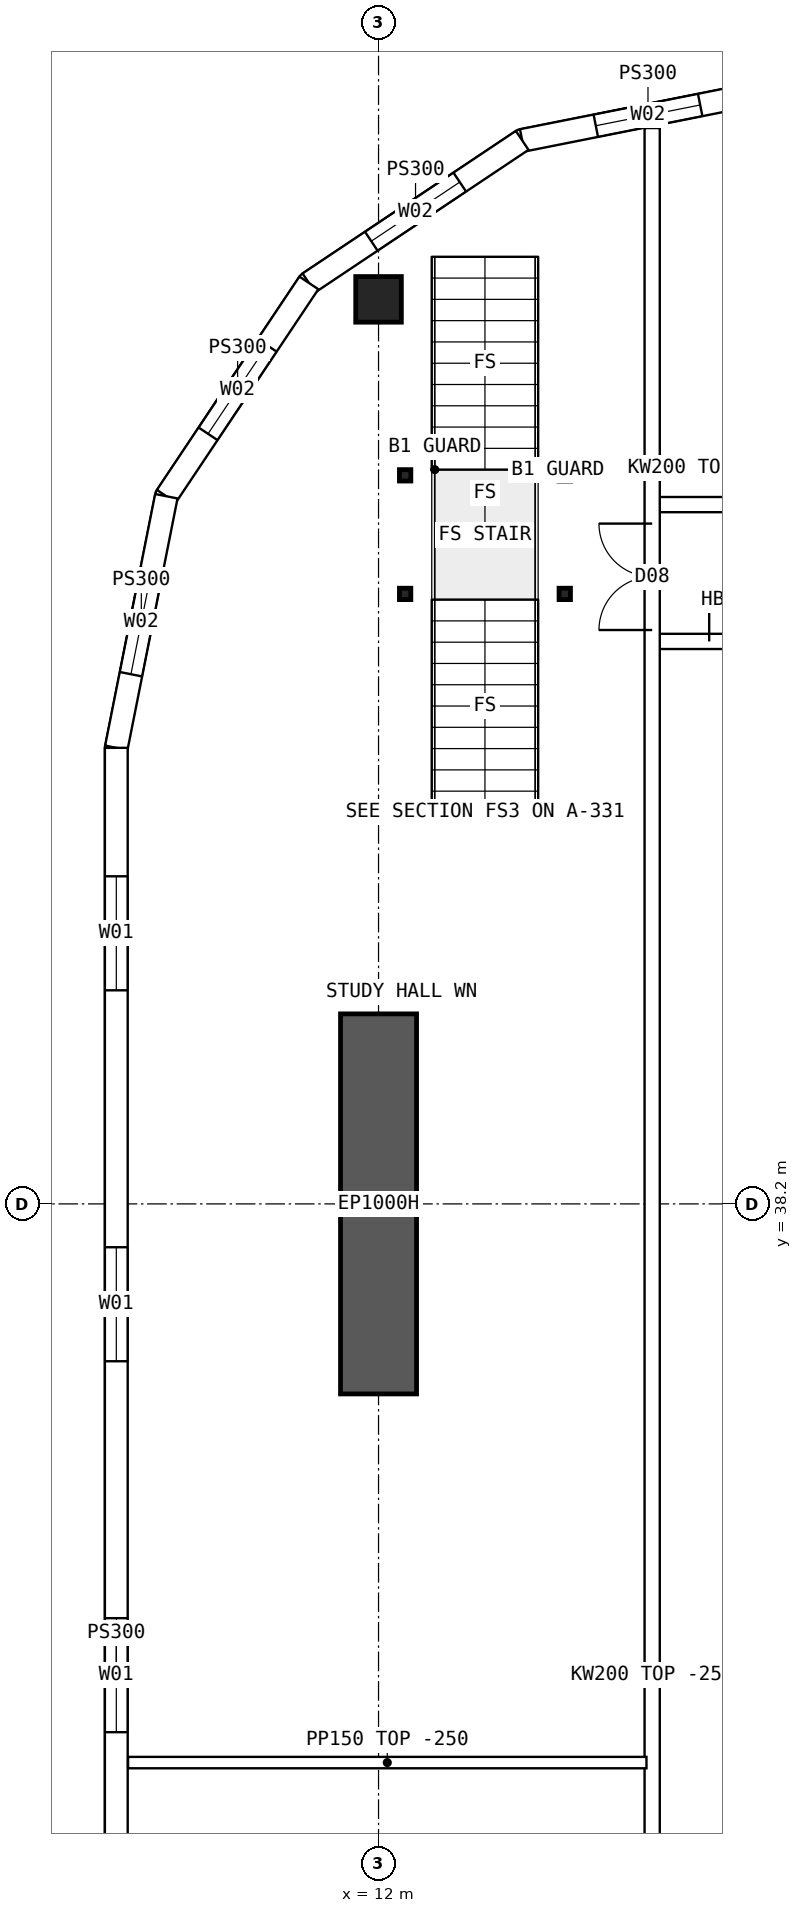
"""IFC4 building model, lengths in metres.
Left out: names, types, materials, properties, quantities, classifications, styles, units other than length and angle.
Written with IfcOpenShell. Run it as: python <this file> out.ifc"""

import sys

from ifc_helpers import new_model, si_unit, direction, frame, frame_2d, origin, origin_2d, place, context, subcontext, project, spatial, polyline, rectangle, hollow_rectangle, outline, extrude, element, fill, save


model = new_model("IFC4")
c1 = context("Model", 3, precision=1e-05, world=origin(), true_north=direction((0.0, 1.0)))
c2 = subcontext(c1, "Body", "Model", "MODEL_VIEW")
j1 = project(units=[si_unit("LENGTHUNIT", "METRE"), si_unit("PLANEANGLEUNIT", "RADIAN")], contexts=[c1])
p1 = place(None, origin())
s1 = spatial("IfcSite", under=j1, at=p1, CompositionType="ELEMENT")
p2 = place(p1, origin())
s2 = spatial("IfcBuilding", under=s1, at=p2, CompositionType="ELEMENT")
p3 = place(p2, frame((0.0, 0.0, 231.55)))
s3 = spatial("IfcBuildingStorey", under=s2, at=p3, CompositionType="ELEMENT", Elevation=231.55)
p4 = place(p3, frame((12.0, 50.1, 0.0), z_axis=(0.0, 0.0, 1.0), x_axis=(1.0, 0.0, 0.0)))
e1 = element("IfcColumn", 1, at=p4, inside=s3, PredefinedType="COLUMN", context=c2, shape_type="SweptSolid", body=[
    extrude(hollow_rectangle(XDim=0.6, YDim=0.6, WallThickness=0.06, at=origin_2d()), origin(), (0.0, 0.0, 1.0), 3.75),
])
p5 = place(p3, frame((12.0, 35.7, 0.0), z_axis=(0.0, 0.0, 1.0), x_axis=(0.0, 1.0, 0.0)))
e2 = element("IfcWall", 2, at=p5, inside=s3, PredefinedType="SHEAR", context=c2, shape_type="SweptSolid", body=[
    extrude(rectangle(XDim=5.0, YDim=1.0, at=frame_2d((2.5, 0.0))), origin(), (0.0, 0.0, 1.0), 3.75),
])
p6 = place(p3, frame((8.55, 44.2, 0.0), z_axis=(0.0, 0.0, 1.0), x_axis=(0.0, -1.0, 0.0)))
e3 = element("IfcWall", 3, at=p6, inside=s3, PredefinedType="SOLIDWALL", context=c2, shape_type="SweptSolid", body=[
    extrude(outline(polyline([(-0.015, -0.15), (24.415, -0.15), (24.385, 0.15), (0.015, 0.15), (-0.015, -0.15)])), origin(), (0.0, 0.0, 1.0), 3.5),
])
p7 = place(p6, frame((1.69, 0.0, 0.9)))
e4 = element("IfcOpeningElement", 4, at=p7, cuts=e3, PredefinedType="OPENING", context=c2, shape_type="SweptSolid", body=[
    extrude(rectangle(XDim=1.5, YDim=2.0, at=frame_2d((0.75, 1.0))), frame((0.0, 0.16, 0.0), z_axis=(0.0, -1.0, 0.0), x_axis=(1.0, 0.0, 0.0)), (0.0, 0.0, 1.0), 0.32),
])
p8 = place(p6, frame((6.57, 0.0, 0.9)))
e5 = element("IfcOpeningElement", 5, at=p8, cuts=e3, PredefinedType="OPENING", context=c2, shape_type="SweptSolid", body=[
    extrude(rectangle(XDim=1.5, YDim=2.0, at=frame_2d((0.75, 1.0))), frame((0.0, 0.16, 0.0), z_axis=(0.0, -1.0, 0.0), x_axis=(1.0, 0.0, 0.0)), (0.0, 0.0, 1.0), 0.32),
])
p9 = place(p6, frame((11.45, 0.0, 0.9)))
e6 = element("IfcOpeningElement", 6, at=p9, cuts=e3, PredefinedType="OPENING", context=c2, shape_type="SweptSolid", body=[
    extrude(rectangle(XDim=1.5, YDim=2.0, at=frame_2d((0.75, 1.0))), frame((0.0, 0.16, 0.0), z_axis=(0.0, -1.0, 0.0), x_axis=(1.0, 0.0, 0.0)), (0.0, 0.0, 1.0), 0.32),
])
p10 = place(p6, frame((16.33, 0.0, 0.9)))
e7 = element("IfcOpeningElement", 7, at=p10, cuts=e3, PredefinedType="OPENING", context=c2, shape_type="SweptSolid", body=[
    extrude(rectangle(XDim=1.5, YDim=2.0, at=frame_2d((0.75, 1.0))), frame((0.0, 0.16, 0.0), z_axis=(0.0, -1.0, 0.0), x_axis=(1.0, 0.0, 0.0)), (0.0, 0.0, 1.0), 0.32),
])
p11 = place(p6, frame((21.21, 0.0, 0.9)))
e8 = element("IfcOpeningElement", 8, at=p11, cuts=e3, PredefinedType="OPENING", context=c2, shape_type="SweptSolid", body=[
    extrude(rectangle(XDim=1.5, YDim=2.0, at=frame_2d((0.75, 1.0))), frame((0.0, 0.16, 0.0), z_axis=(0.0, -1.0, 0.0), x_axis=(1.0, 0.0, 0.0)), (0.0, 0.0, 1.0), 0.32),
])
p12 = place(p3, frame((17.2, 52.85, 0.0), z_axis=(0.0, 0.0, 1.0), x_axis=(-0.98078325777, -0.195100490205, 0.0)))
e9 = element("IfcWall", 9, at=p12, inside=s3, PredefinedType="SOLIDWALL", context=c2, shape_type="SweptSolid", body=[
    extrude(outline(polyline([(-0.03, -0.15), (3.405, -0.15), (3.345, 0.15), (0.03, 0.15), (-0.03, -0.15)])), origin(), (0.0, 0.0, 1.0), 3.5),
])
p13 = place(p12, frame((0.988, 0.0, 0.9)))
e10 = element("IfcOpeningElement", 10, at=p13, cuts=e9, PredefinedType="OPENING", context=c2, shape_type="SweptSolid", body=[
    extrude(rectangle(XDim=1.4, YDim=1.8, at=frame_2d((0.7, 0.9))), frame((0.0, 0.16, 0.0), z_axis=(0.0, -1.0, 0.0), x_axis=(1.0, 0.0, 0.0)), (0.0, 0.0, 1.0), 0.32),
])
p14 = place(p3, frame((13.89, 52.192, 0.0), z_axis=(0.0, 0.0, 1.0), x_axis=(-0.831460037396, -0.555584562613, 0.0)))
e11 = element("IfcWall", 11, at=p14, inside=s3, PredefinedType="SOLIDWALL", context=c2, shape_type="SweptSolid", body=[
    extrude(outline(polyline([(-0.03, -0.15), (3.405, -0.15), (3.345, 0.15), (0.03, 0.15), (-0.03, -0.15)])), origin(), (0.0, 0.0, 1.0), 3.5),
])
p15 = place(p14, frame((0.988, 0.0, 0.9)))
e12 = element("IfcOpeningElement", 12, at=p15, cuts=e11, PredefinedType="OPENING", context=c2, shape_type="SweptSolid", body=[
    extrude(rectangle(XDim=1.4, YDim=1.8, at=frame_2d((0.7, 0.9))), frame((0.0, 0.16, 0.0), z_axis=(0.0, -1.0, 0.0), x_axis=(1.0, 0.0, 0.0)), (0.0, 0.0, 1.0), 0.32),
])
p16 = place(p3, frame((11.083, 50.316, 0.0), z_axis=(0.0, 0.0, 1.0), x_axis=(-0.555567969291, -0.831471124873, 0.0)))
e13 = element("IfcWall", 13, at=p16, inside=s3, PredefinedType="SOLIDWALL", context=c2, shape_type="SweptSolid", body=[
    extrude(outline(polyline([(-0.03, -0.15), (3.405, -0.15), (3.345, 0.15), (0.03, 0.15), (-0.03, -0.15)])), origin(), (0.0, 0.0, 1.0), 3.5),
])
p17 = place(p16, frame((0.988, 0.0, 0.9)))
e14 = element("IfcOpeningElement", 14, at=p17, cuts=e13, PredefinedType="OPENING", context=c2, shape_type="SweptSolid", body=[
    extrude(rectangle(XDim=1.4, YDim=1.8, at=frame_2d((0.7, 0.9))), frame((0.0, 0.16, 0.0), z_axis=(0.0, -1.0, 0.0), x_axis=(1.0, 0.0, 0.0)), (0.0, 0.0, 1.0), 0.32),
])
p18 = place(p3, frame((9.208, 47.51, 0.0), z_axis=(0.0, 0.0, 1.0), x_axis=(-0.19508664885, -0.980786011034, 0.0)))
e15 = element("IfcWall", 15, at=p18, inside=s3, PredefinedType="SOLIDWALL", context=c2, shape_type="SweptSolid", body=[
    extrude(outline(polyline([(-0.03, -0.15), (3.39, -0.15), (3.36, 0.15), (0.03, 0.15), (-0.03, -0.15)])), origin(), (0.0, 0.0, 1.0), 3.5),
])
p19 = place(p18, frame((0.988, 0.0, 0.9)))
e16 = element("IfcOpeningElement", 16, at=p19, cuts=e15, PredefinedType="OPENING", context=c2, shape_type="SweptSolid", body=[
    extrude(rectangle(XDim=1.4, YDim=1.8, at=frame_2d((0.7, 0.9))), frame((0.0, 0.16, 0.0), z_axis=(0.0, -1.0, 0.0), x_axis=(1.0, 0.0, 0.0)), (0.0, 0.0, 1.0), 0.32),
])
p20 = place(p3, frame((15.6, 47.4, 0.0), z_axis=(0.0, 0.0, 1.0), x_axis=(1.0, 0.0, 0.0)))
e17 = element("IfcWall", 17, at=p20, inside=s3, PredefinedType="SOLIDWALL", context=c2, shape_type="SweptSolid", body=[
    extrude(rectangle(XDim=2.05, YDim=0.2, at=frame_2d((1.025, 0.0))), origin(), (0.0, 0.0, 1.0), 3.5),
])
p21 = place(p20, frame((0.95, 0.0, 0.0)))
e18 = element("IfcOpeningElement", 18, at=p21, cuts=e17, PredefinedType="OPENING", context=c2, shape_type="SweptSolid", body=[
    extrude(rectangle(XDim=0.9, YDim=2.1, at=frame_2d((0.45, 1.05))), frame((0.0, 0.11, 0.0), z_axis=(0.0, -1.0, 0.0), x_axis=(1.0, 0.0, 0.0)), (0.0, 0.0, 1.0), 0.22),
])
p22 = place(p3, frame((15.6, 45.6, 0.0), z_axis=(0.0, 0.0, 1.0), x_axis=(1.0, 0.0, 0.0)))
e19 = element("IfcWall", 19, at=p22, inside=s3, PredefinedType="SOLIDWALL", context=c2, shape_type="SweptSolid", body=[
    extrude(rectangle(XDim=2.05, YDim=0.2, at=frame_2d((1.025, 0.0))), origin(), (0.0, 0.0, 1.0), 3.5),
])
p23 = place(p22, frame((0.75, 0.0, 0.0)))
e20 = element("IfcOpeningElement", 20, at=p23, cuts=e19, PredefinedType="OPENING", context=c2, shape_type="SweptSolid", body=[
    extrude(rectangle(XDim=1.2, YDim=2.1, at=frame_2d((0.6, 1.05))), frame((0.0, 0.11, 0.0), z_axis=(0.0, -1.0, 0.0), x_axis=(1.0, 0.0, 0.0)), (0.0, 0.0, 1.0), 0.22),
])
p24 = place(p3, frame((8.705, 30.85, 0.0), z_axis=(0.0, 0.0, 1.0), x_axis=(1.0, 0.0, 0.0)))
e21 = element("IfcWall", 21, at=p24, inside=s3, PredefinedType="PARTITIONING", context=c2, shape_type="SweptSolid", body=[
    extrude(outline(polyline([(0.0, 0.0), (6.82, 0.0), (6.82, 3.5), (3.597, 3.5), (3.595, 3.05), (2.997, 3.05), (2.995, 3.5), (0.0, 3.5), (0.0, 0.0)])), frame((0.0, 0.075, 0.0), z_axis=(0.0, -1.0, 0.0), x_axis=(1.0, 0.0, 0.0)), (0.0, 0.0, 1.0), 0.15),
])
p25 = place(p3, frame((15.6, 11.646, 0.0), z_axis=(0.0, 0.0, 1.0), x_axis=(0.0, 1.0, 0.0)))
e22 = element("IfcWall", 22, at=p25, inside=s3, PredefinedType="SOLIDWALL", context=c2, shape_type="SweptSolid", body=[
    extrude(rectangle(XDim=40.708, YDim=0.2, at=frame_2d((20.354, 0.0))), origin(), (0.0, 0.0, 1.0), 3.5),
])
p26 = place(p25, frame((13.434, 0.0, 0.0)))
e23 = element("IfcOpeningElement", 23, at=p26, cuts=e22, PredefinedType="OPENING", context=c2, shape_type="SweptSolid", body=[
    extrude(rectangle(XDim=1.2, YDim=2.1, at=frame_2d((0.6, 1.05))), frame((0.0, 0.11, 0.0), z_axis=(0.0, -1.0, 0.0), x_axis=(1.0, 0.0, 0.0)), (0.0, 0.0, 1.0), 0.22),
])
p27 = place(p25, frame((5.104, 0.0, 0.0)))
e24 = element("IfcOpeningElement", 24, at=p27, cuts=e22, PredefinedType="OPENING", context=c2, shape_type="SweptSolid", body=[
    extrude(rectangle(XDim=1.4, YDim=2.1, at=frame_2d((0.7, 1.05))), frame((0.0, 0.11, 0.0), z_axis=(0.0, -1.0, 0.0), x_axis=(1.0, 0.0, 0.0)), (0.0, 0.0, 1.0), 0.22),
])
p28 = place(p25, frame((34.104, 0.0, 0.0)))
e25 = element("IfcOpeningElement", 25, at=p28, cuts=e22, PredefinedType="OPENING", context=c2, shape_type="SweptSolid", body=[
    extrude(rectangle(XDim=1.4, YDim=2.1, at=frame_2d((0.7, 1.05))), frame((0.0, 0.11, 0.0), z_axis=(0.0, -1.0, 0.0), x_axis=(1.0, 0.0, 0.0)), (0.0, 0.0, 1.0), 0.22),
])
for number, where, z_axis, x_axis in (
    (26, (12.35, 46.225, 0.0), (0.0, 0.0, 1.0), (1.0, 0.0, 0.0)),
    (27, (14.45, 46.225, 0.0), (0.0, 0.0, 1.0), (1.0, 0.0, 0.0)),
    (28, (12.35, 47.785, 0.0), (0.0, 0.0, 1.0), (1.0, 0.0, 0.0)),
    (29, (14.45, 47.785, 0.0), (0.0, 0.0, 1.0), (1.0, 0.0, 0.0)),
):
    element("IfcColumn", number, at=place(p3, frame(where, z_axis=z_axis, x_axis=x_axis)), inside=s3, PredefinedType="COLUMN", context=c2, shape_type="SweptSolid", body=[
        extrude(hollow_rectangle(XDim=0.15, YDim=0.15, WallThickness=0.008, at=origin_2d()), origin(), (0.0, 0.0, 1.0), 3.5),
    ])
p29 = place(p7, origin())
e30 = element("IfcWindow", 30, at=p29, inside=s3, PartitioningType="SINGLE_PANEL", PredefinedType="WINDOW", context=c2, shape_type="SweptSolid", body=[
    extrude(rectangle(XDim=1.5, YDim=2.0, at=frame_2d((0.75, 1.0))), frame((0.0, 0.03, 0.0), z_axis=(0.0, -1.0, 0.0), x_axis=(1.0, 0.0, 0.0)), (0.0, 0.0, 1.0), 0.06),
])
fill(e4, e30)
p30 = place(p8, origin())
e31 = element("IfcWindow", 31, at=p30, inside=s3, PartitioningType="SINGLE_PANEL", PredefinedType="WINDOW", context=c2, shape_type="SweptSolid", body=[
    extrude(rectangle(XDim=1.5, YDim=2.0, at=frame_2d((0.75, 1.0))), frame((0.0, 0.03, 0.0), z_axis=(0.0, -1.0, 0.0), x_axis=(1.0, 0.0, 0.0)), (0.0, 0.0, 1.0), 0.06),
])
fill(e5, e31)
p31 = place(p9, origin())
e32 = element("IfcWindow", 32, at=p31, inside=s3, PartitioningType="SINGLE_PANEL", PredefinedType="WINDOW", context=c2, shape_type="SweptSolid", body=[
    extrude(rectangle(XDim=1.5, YDim=2.0, at=frame_2d((0.75, 1.0))), frame((0.0, 0.03, 0.0), z_axis=(0.0, -1.0, 0.0), x_axis=(1.0, 0.0, 0.0)), (0.0, 0.0, 1.0), 0.06),
])
fill(e6, e32)
p32 = place(p13, origin())
e33 = element("IfcWindow", 33, at=p32, inside=s3, PartitioningType="SINGLE_PANEL", PredefinedType="WINDOW", context=c2, shape_type="SweptSolid", body=[
    extrude(rectangle(XDim=1.4, YDim=1.8, at=frame_2d((0.7, 0.9))), frame((0.0, 0.03, 0.0), z_axis=(0.0, -1.0, 0.0), x_axis=(1.0, 0.0, 0.0)), (0.0, 0.0, 1.0), 0.06),
])
fill(e10, e33)
p33 = place(p15, origin())
e34 = element("IfcWindow", 34, at=p33, inside=s3, PartitioningType="SINGLE_PANEL", PredefinedType="WINDOW", context=c2, shape_type="SweptSolid", body=[
    extrude(rectangle(XDim=1.4, YDim=1.8, at=frame_2d((0.7, 0.9))), frame((0.0, 0.03, 0.0), z_axis=(0.0, -1.0, 0.0), x_axis=(1.0, 0.0, 0.0)), (0.0, 0.0, 1.0), 0.06),
])
fill(e12, e34)
p34 = place(p17, origin())
e35 = element("IfcWindow", 35, at=p34, inside=s3, PartitioningType="SINGLE_PANEL", PredefinedType="WINDOW", context=c2, shape_type="SweptSolid", body=[
    extrude(rectangle(XDim=1.4, YDim=1.8, at=frame_2d((0.7, 0.9))), frame((0.0, 0.03, 0.0), z_axis=(0.0, -1.0, 0.0), x_axis=(1.0, 0.0, 0.0)), (0.0, 0.0, 1.0), 0.06),
])
fill(e14, e35)
p35 = place(p19, origin())
e36 = element("IfcWindow", 36, at=p35, inside=s3, PartitioningType="SINGLE_PANEL", PredefinedType="WINDOW", context=c2, shape_type="SweptSolid", body=[
    extrude(rectangle(XDim=1.4, YDim=1.8, at=frame_2d((0.7, 0.9))), frame((0.0, 0.03, 0.0), z_axis=(0.0, -1.0, 0.0), x_axis=(1.0, 0.0, 0.0)), (0.0, 0.0, 1.0), 0.06),
])
fill(e16, e36)
p36 = place(p23, origin())
e37 = element("IfcDoor", 37, at=p36, inside=s3, OperationType="DOUBLE_DOOR_SINGLE_SWING", PredefinedType="DOOR", context=c2, shape_type="SweptSolid", body=[
    extrude(rectangle(XDim=1.2, YDim=2.1, at=frame_2d((0.6, 1.05))), frame((0.0, 0.025, 0.0), z_axis=(0.0, -1.0, 0.0), x_axis=(1.0, 0.0, 0.0)), (0.0, 0.0, 1.0), 0.05),
])
fill(e20, e37)
p37 = place(p28, origin())
e38 = element("IfcDoor", 38, at=p37, inside=s3, OperationType="DOUBLE_DOOR_SINGLE_SWING", PredefinedType="DOOR", context=c2, shape_type="SweptSolid", body=[
    extrude(rectangle(XDim=1.4, YDim=2.1, at=frame_2d((0.7, 1.05))), frame((0.0, 0.025, 0.0), z_axis=(0.0, -1.0, 0.0), x_axis=(1.0, 0.0, 0.0)), (0.0, 0.0, 1.0), 0.05),
])
fill(e25, e38)
save(model, sys.argv[1])
